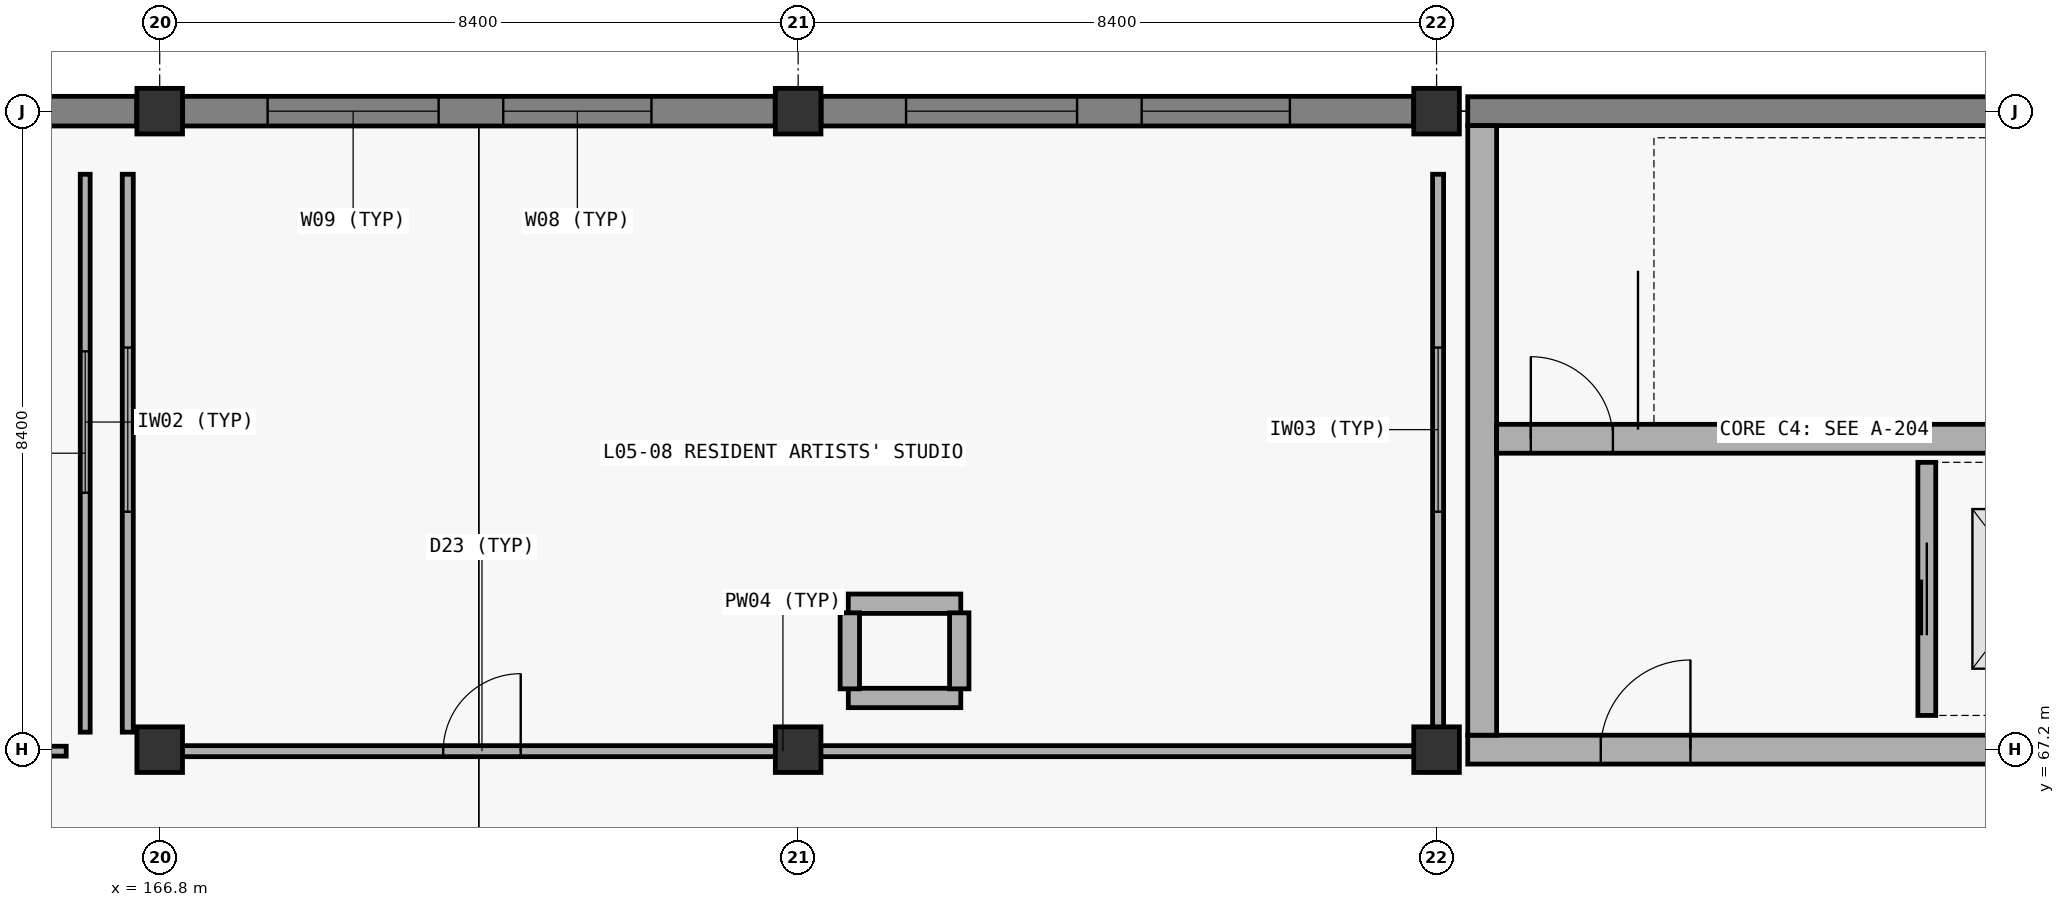
"""IFC4 building model, lengths in metres.
Left out: names, types, materials, properties, quantities, classifications, styles, units other than length and angle.
Written with IfcOpenShell. Run it as: python <this file> out.ifc"""

import sys

from ifc_helpers import new_model, si_unit, direction, frame, frame_2d, origin, origin_2d, place, context, subcontext, project, spatial, rectangle, extrude, element, fill, save


model = new_model("IFC4")
c1 = context("Model", 3, precision=1e-05, world=origin(), true_north=direction((0.0, 1.0)))
c2 = subcontext(c1, "Body", "Model", "MODEL_VIEW")
j1 = project(units=[si_unit("LENGTHUNIT", "METRE"), si_unit("PLANEANGLEUNIT", "RADIAN")], contexts=[c1])
p1 = place(None, origin())
s1 = spatial("IfcSite", under=j1, at=p1, CompositionType="ELEMENT")
p2 = place(p1, origin())
s2 = spatial("IfcBuilding", under=s1, at=p2, CompositionType="ELEMENT")
p3 = place(p2, frame((0.0, 0.0, 26.4)))
s3 = spatial("IfcBuildingStorey", under=s2, at=p3, CompositionType="ELEMENT", Elevation=26.4)
for number, where, z_axis, x_axis in (
    (1, (166.8, 67.2, 0.0), (0.0, 0.0, 1.0), (1.0, 0.0, 0.0)),
    (2, (166.8, 75.6, 0.0), (0.0, 0.0, 1.0), (1.0, 0.0, 0.0)),
    (3, (175.2, 67.2, 0.0), (0.0, 0.0, 1.0), (1.0, 0.0, 0.0)),
    (4, (175.2, 75.6, 0.0), (0.0, 0.0, 1.0), (1.0, 0.0, 0.0)),
    (5, (183.6, 67.2, 0.0), (0.0, 0.0, 1.0), (1.0, 0.0, 0.0)),
    (6, (183.6, 75.6, 0.0), (0.0, 0.0, 1.0), (1.0, 0.0, 0.0)),
):
    element("IfcColumn", number, at=place(p3, frame(where, z_axis=z_axis, x_axis=x_axis)), inside=s3, PredefinedType="COLUMN", context=c2, shape_type="SweptSolid", body=[
        extrude(rectangle(XDim=0.6, YDim=0.6, at=origin_2d()), origin(), (0.0, 0.0, 1.0), 4.5),
    ])
p4 = place(p3, frame((184.01, 67.2, 0.0), z_axis=(0.0, 0.0, 1.0), x_axis=(1.0, 0.0, 0.0)))
e7 = element("IfcWall", 7, at=p4, inside=s3, PredefinedType="SHEAR", context=c2, shape_type="SweptSolid", body=[
    extrude(rectangle(XDim=9.38, YDim=0.38, at=frame_2d((4.69, 0.0))), origin(), (0.0, 0.0, 1.0), 4.5),
])
p5 = place(p4, frame((1.75, 0.0, 0.0)))
e8 = element("IfcOpeningElement", 8, at=p5, cuts=e7, PredefinedType="OPENING", context=c2, shape_type="SweptSolid", body=[
    extrude(rectangle(XDim=1.18, YDim=2.24, at=frame_2d((0.59, 1.12))), frame((0.0, 0.2, 0.0), z_axis=(0.0, -1.0, 0.0), x_axis=(1.0, 0.0, 0.0)), (0.0, 0.0, 1.0), 0.4),
])
p6 = place(p3, frame((184.01, 75.6, 0.0), z_axis=(0.0, 0.0, 1.0), x_axis=(1.0, 0.0, 0.0)))
e9 = element("IfcWall", 9, at=p6, inside=s3, PredefinedType="SHEAR", context=c2, shape_type="SweptSolid", body=[
    extrude(rectangle(XDim=9.38, YDim=0.38, at=frame_2d((4.69, 0.0))), origin(), (0.0, 0.0, 1.0), 4.5),
])
p7 = place(p3, frame((184.2, 67.39, 0.0), z_axis=(0.0, 0.0, 1.0), x_axis=(0.0, 1.0, 0.0)))
e10 = element("IfcWall", 10, at=p7, inside=s3, PredefinedType="SHEAR", context=c2, shape_type="SweptSolid", body=[
    extrude(rectangle(XDim=8.02, YDim=0.38, at=frame_2d((4.01, 0.0))), origin(), (0.0, 0.0, 1.0), 4.5),
])
p8 = place(p3, frame((184.39, 71.29, 0.0), z_axis=(0.0, 0.0, 1.0), x_axis=(1.0, 0.0, 0.0)))
e11 = element("IfcWall", 11, at=p8, inside=s3, PredefinedType="SHEAR", context=c2, shape_type="SweptSolid", body=[
    extrude(rectangle(XDim=8.62, YDim=0.38, at=frame_2d((4.31, 0.0))), origin(), (0.0, 0.0, 1.0), 4.5),
])
p9 = place(p8, frame((0.45, 0.0, 0.0)))
e12 = element("IfcOpeningElement", 12, at=p9, cuts=e11, PredefinedType="OPENING", context=c2, shape_type="SweptSolid", body=[
    extrude(rectangle(XDim=1.08, YDim=2.18, at=frame_2d((0.54, 1.09))), frame((0.0, 0.2, 0.0), z_axis=(0.0, -1.0, 0.0), x_axis=(1.0, 0.0, 0.0)), (0.0, 0.0, 1.0), 0.4),
])
p10 = place(p3, frame((158.702, 75.6, 0.0), z_axis=(0.0, 0.0, 1.0), x_axis=(1.0, 0.0, 0.0)))
e13 = element("IfcWall", 13, at=p10, inside=s3, PredefinedType="SOLIDWALL", context=c2, shape_type="SweptSolid", body=[
    extrude(rectangle(XDim=7.796, YDim=0.39, at=frame_2d((3.898, 0.0))), origin(), (0.0, 0.0, 1.0), 3.83),
])
p11 = place(p10, frame((1.118, 0.0, 0.85)))
e14 = element("IfcOpeningElement", 14, at=p11, cuts=e13, PredefinedType="OPENING", context=c2, shape_type="SweptSolid", body=[
    extrude(rectangle(XDim=2.25, YDim=2.25, at=frame_2d((1.125, 1.125))), frame((0.0, 0.205, 0.0), z_axis=(0.0, -1.0, 0.0), x_axis=(1.0, 0.0, 0.0)), (0.0, 0.0, 1.0), 0.41),
])
p12 = place(p10, frame((4.218, 0.0, 0.85)))
e15 = element("IfcOpeningElement", 15, at=p12, cuts=e13, PredefinedType="OPENING", context=c2, shape_type="SweptSolid", body=[
    extrude(rectangle(XDim=1.95, YDim=2.3, at=frame_2d((0.975, 1.15))), frame((0.0, 0.205, 0.0), z_axis=(0.0, -1.0, 0.0), x_axis=(1.0, 0.0, 0.0)), (0.0, 0.0, 1.0), 0.41),
])
p13 = place(p3, frame((167.102, 75.6, 0.0), z_axis=(0.0, 0.0, 1.0), x_axis=(1.0, 0.0, 0.0)))
e16 = element("IfcWall", 16, at=p13, inside=s3, PredefinedType="SOLIDWALL", context=c2, shape_type="SweptSolid", body=[
    extrude(rectangle(XDim=7.796, YDim=0.39, at=frame_2d((3.898, 0.0))), origin(), (0.0, 0.0, 1.0), 3.58),
])
p14 = place(p13, frame((1.118, 0.0, 0.85)))
e17 = element("IfcOpeningElement", 17, at=p14, cuts=e16, PredefinedType="OPENING", context=c2, shape_type="SweptSolid", body=[
    extrude(rectangle(XDim=2.25, YDim=2.25, at=frame_2d((1.125, 1.125))), frame((0.0, 0.205, 0.0), z_axis=(0.0, -1.0, 0.0), x_axis=(1.0, 0.0, 0.0)), (0.0, 0.0, 1.0), 0.41),
])
p15 = place(p13, frame((4.218, 0.0, 0.85)))
e18 = element("IfcOpeningElement", 18, at=p15, cuts=e16, PredefinedType="OPENING", context=c2, shape_type="SweptSolid", body=[
    extrude(rectangle(XDim=1.95, YDim=2.3, at=frame_2d((0.975, 1.15))), frame((0.0, 0.205, 0.0), z_axis=(0.0, -1.0, 0.0), x_axis=(1.0, 0.0, 0.0)), (0.0, 0.0, 1.0), 0.41),
])
p16 = place(p3, frame((175.502, 75.6, 0.0), z_axis=(0.0, 0.0, 1.0), x_axis=(1.0, 0.0, 0.0)))
e19 = element("IfcWall", 19, at=p16, inside=s3, PredefinedType="SOLIDWALL", context=c2, shape_type="SweptSolid", body=[
    extrude(rectangle(XDim=7.796, YDim=0.39, at=frame_2d((3.898, 0.0))), origin(), (0.0, 0.0, 1.0), 3.83),
])
p17 = place(p16, frame((1.118, 0.0, 0.85)))
e20 = element("IfcOpeningElement", 20, at=p17, cuts=e19, PredefinedType="OPENING", context=c2, shape_type="SweptSolid", body=[
    extrude(rectangle(XDim=2.25, YDim=2.25, at=frame_2d((1.125, 1.125))), frame((0.0, 0.205, 0.0), z_axis=(0.0, -1.0, 0.0), x_axis=(1.0, 0.0, 0.0)), (0.0, 0.0, 1.0), 0.41),
])
p18 = place(p16, frame((4.218, 0.0, 0.85)))
e21 = element("IfcOpeningElement", 21, at=p18, cuts=e19, PredefinedType="OPENING", context=c2, shape_type="SweptSolid", body=[
    extrude(rectangle(XDim=1.95, YDim=2.3, at=frame_2d((0.975, 1.15))), frame((0.0, 0.205, 0.0), z_axis=(0.0, -1.0, 0.0), x_axis=(1.0, 0.0, 0.0)), (0.0, 0.0, 1.0), 0.41),
])
p19 = place(p3, frame((190.05, 67.65, 0.0), z_axis=(0.0, 0.0, 1.0), x_axis=(0.0, 1.0, 0.0)))
e22 = element("IfcWall", 22, at=p19, inside=s3, PredefinedType="PARTITIONING", context=c2, shape_type="SweptSolid", body=[
    extrude(rectangle(XDim=3.33, YDim=0.235, at=frame_2d((1.665, 0.0))), origin(), (0.0, 0.0, 1.0), 4.2),
])
p20 = place(p19, frame((1.055, 0.0, 0.0)))
e23 = element("IfcOpeningElement", 23, at=p20, cuts=e22, PredefinedType="OPENING", context=c2, shape_type="SweptSolid", body=[
    extrude(rectangle(XDim=1.22, YDim=2.24, at=frame_2d((0.61, 1.12))), frame((0.0, 0.127, 0.0), z_axis=(0.0, -1.0, 0.0), x_axis=(1.0, 0.0, 0.0)), (0.0, 0.0, 1.0), 0.255),
])
for number, where, z_axis, x_axis in (
    (24, (175.86, 69.12, 0.0), (0.0, 0.0, 1.0), (1.0, 0.0, 0.0)),
    (25, (175.86, 67.88, 0.0), (0.0, 0.0, 1.0), (1.0, 0.0, 0.0)),
):
    element("IfcWall", number, at=place(p3, frame(where, z_axis=z_axis, x_axis=x_axis)), inside=s3, PredefinedType="PARTITIONING", context=c2, shape_type="SweptSolid", body=[
        extrude(rectangle(XDim=1.48, YDim=0.255, at=frame_2d((0.74, 0.0))), origin(), (0.0, 0.0, 1.0), 4.2),
    ])
for number, where, z_axis, x_axis in (
    (26, (175.88, 68.0, 0.0), (0.0, 0.0, 1.0), (0.0, 1.0, 0.0)),
    (27, (177.32, 68.0, 0.0), (0.0, 0.0, 1.0), (0.0, 1.0, 0.0)),
):
    element("IfcWall", number, at=place(p3, frame(where, z_axis=z_axis, x_axis=x_axis)), inside=s3, PredefinedType="PARTITIONING", context=c2, shape_type="SweptSolid", body=[
        extrude(rectangle(XDim=1.0, YDim=0.255, at=frame_2d((0.5, 0.0))), origin(), (0.0, 0.0, 1.0), 4.2),
    ])
p21 = place(p3, frame((142.43, 67.18, 0.0), z_axis=(0.0, 0.0, 1.0), x_axis=(1.0, 0.0, 0.0)))
e28 = element("IfcWall", 28, at=p21, inside=s3, PredefinedType="PARTITIONING", context=c2, shape_type="SweptSolid", body=[
    extrude(rectangle(XDim=23.14, YDim=0.13, at=frame_2d((11.57, 0.0))), origin(), (0.0, 0.0, 1.0), 3.73),
])
p22 = place(p21, frame((19.4, 0.0, 0.0)))
e29 = element("IfcOpeningElement", 29, at=p22, cuts=e28, PredefinedType="OPENING", context=c2, shape_type="SweptSolid", body=[
    extrude(rectangle(XDim=1.62, YDim=2.38, at=frame_2d((0.81, 1.19))), frame((0.0, 0.075, 0.0), z_axis=(0.0, -1.0, 0.0), x_axis=(1.0, 0.0, 0.0)), (0.0, 0.0, 1.0), 0.15),
])
p23 = place(p3, frame((165.82, 67.43, 0.0), z_axis=(0.0, 0.0, 1.0), x_axis=(0.0, 1.0, 0.0)))
e30 = element("IfcWall", 30, at=p23, inside=s3, PredefinedType="PARTITIONING", context=c2, shape_type="SweptSolid", body=[
    extrude(rectangle(XDim=7.34, YDim=0.13, at=frame_2d((3.67, 0.0))), origin(), (0.0, 0.0, 1.0), 3.78),
])
p24 = place(p23, frame((3.15, 0.0, 0.9)))
e31 = element("IfcOpeningElement", 31, at=p24, cuts=e30, PredefinedType="OPENING", context=c2, shape_type="SweptSolid", body=[
    extrude(rectangle(XDim=1.86, YDim=1.28, at=frame_2d((0.93, 0.64))), frame((0.0, 0.075, 0.0), z_axis=(0.0, -1.0, 0.0), x_axis=(1.0, 0.0, 0.0)), (0.0, 0.0, 1.0), 0.15),
])
p25 = place(p3, frame((166.63, 67.18, 0.0), z_axis=(0.0, 0.0, 1.0), x_axis=(1.0, 0.0, 0.0)))
e32 = element("IfcWall", 32, at=p25, inside=s3, PredefinedType="PARTITIONING", context=c2, shape_type="SweptSolid", body=[
    extrude(rectangle(XDim=16.74, YDim=0.145, at=frame_2d((8.37, 0.0))), origin(), (0.0, 0.0, 1.0), 3.73),
])
p26 = place(p25, frame((3.9, 0.0, 0.0)))
e33 = element("IfcOpeningElement", 33, at=p26, cuts=e32, PredefinedType="OPENING", context=c2, shape_type="SweptSolid", body=[
    extrude(rectangle(XDim=1.02, YDim=2.26, at=frame_2d((0.51, 1.13))), frame((0.0, 0.083, 0.0), z_axis=(0.0, -1.0, 0.0), x_axis=(1.0, 0.0, 0.0)), (0.0, 0.0, 1.0), 0.165),
])
p27 = place(p3, frame((166.38, 67.43, 0.0), z_axis=(0.0, 0.0, 1.0), x_axis=(0.0, 1.0, 0.0)))
e34 = element("IfcWall", 34, at=p27, inside=s3, PredefinedType="PARTITIONING", context=c2, shape_type="SweptSolid", body=[
    extrude(rectangle(XDim=7.34, YDim=0.145, at=frame_2d((3.67, 0.0))), origin(), (0.0, 0.0, 1.0), 3.78),
])
p28 = place(p27, frame((2.9, 0.0, 0.9)))
e35 = element("IfcOpeningElement", 35, at=p28, cuts=e34, PredefinedType="OPENING", context=c2, shape_type="SweptSolid", body=[
    extrude(rectangle(XDim=2.16, YDim=1.42, at=frame_2d((1.08, 0.71))), frame((0.0, 0.083, 0.0), z_axis=(0.0, -1.0, 0.0), x_axis=(1.0, 0.0, 0.0)), (0.0, 0.0, 1.0), 0.165),
])
p29 = place(p3, frame((183.62, 67.43, 0.0), z_axis=(0.0, 0.0, 1.0), x_axis=(0.0, 1.0, 0.0)))
e36 = element("IfcWall", 36, at=p29, inside=s3, PredefinedType="PARTITIONING", context=c2, shape_type="SweptSolid", body=[
    extrude(rectangle(XDim=7.34, YDim=0.145, at=frame_2d((3.67, 0.0))), origin(), (0.0, 0.0, 1.0), 3.73),
])
p30 = place(p29, frame((2.9, 0.0, 0.9)))
e37 = element("IfcOpeningElement", 37, at=p30, cuts=e36, PredefinedType="OPENING", context=c2, shape_type="SweptSolid", body=[
    extrude(rectangle(XDim=2.16, YDim=1.42, at=frame_2d((1.08, 0.71))), frame((0.0, 0.083, 0.0), z_axis=(0.0, -1.0, 0.0), x_axis=(1.0, 0.0, 0.0)), (0.0, 0.0, 1.0), 0.165),
])
p31 = place(p14, origin())
e38 = element("IfcWindow", 38, at=p31, inside=s3, PartitioningType="SINGLE_PANEL", PredefinedType="WINDOW", context=c2, shape_type="SweptSolid", body=[
    extrude(rectangle(XDim=2.25, YDim=2.25, at=frame_2d((1.125, 1.125))), frame((0.0, 0.03, 0.0), z_axis=(0.0, -1.0, 0.0), x_axis=(1.0, 0.0, 0.0)), (0.0, 0.0, 1.0), 0.06),
])
fill(e17, e38)
p32 = place(p15, origin())
e39 = element("IfcWindow", 39, at=p32, inside=s3, PartitioningType="SINGLE_PANEL", PredefinedType="WINDOW", context=c2, shape_type="SweptSolid", body=[
    extrude(rectangle(XDim=1.95, YDim=2.3, at=frame_2d((0.975, 1.15))), frame((0.0, 0.03, 0.0), z_axis=(0.0, -1.0, 0.0), x_axis=(1.0, 0.0, 0.0)), (0.0, 0.0, 1.0), 0.06),
])
fill(e18, e39)
p33 = place(p17, origin())
e40 = element("IfcWindow", 40, at=p33, inside=s3, PartitioningType="SINGLE_PANEL", PredefinedType="WINDOW", context=c2, shape_type="SweptSolid", body=[
    extrude(rectangle(XDim=2.25, YDim=2.25, at=frame_2d((1.125, 1.125))), frame((0.0, 0.03, 0.0), z_axis=(0.0, -1.0, 0.0), x_axis=(1.0, 0.0, 0.0)), (0.0, 0.0, 1.0), 0.06),
])
fill(e20, e40)
p34 = place(p18, origin())
e41 = element("IfcWindow", 41, at=p34, inside=s3, PartitioningType="SINGLE_PANEL", PredefinedType="WINDOW", context=c2, shape_type="SweptSolid", body=[
    extrude(rectangle(XDim=1.95, YDim=2.3, at=frame_2d((0.975, 1.15))), frame((0.0, 0.03, 0.0), z_axis=(0.0, -1.0, 0.0), x_axis=(1.0, 0.0, 0.0)), (0.0, 0.0, 1.0), 0.06),
])
fill(e21, e41)
p35 = place(p9, origin())
e42 = element("IfcDoor", 42, at=p35, inside=s3, OperationType="SINGLE_SWING_LEFT", PredefinedType="DOOR", context=c2, shape_type="SweptSolid", body=[
    extrude(rectangle(XDim=1.08, YDim=2.18, at=frame_2d((0.54, 1.09))), frame((0.0, 0.025, 0.0), z_axis=(0.0, -1.0, 0.0), x_axis=(1.0, 0.0, 0.0)), (0.0, 0.0, 1.0), 0.05),
])
fill(e12, e42)
p36 = place(p5, origin())
e43 = element("IfcDoor", 43, at=p36, inside=s3, OperationType="SINGLE_SWING_RIGHT", PredefinedType="DOOR", context=c2, shape_type="SweptSolid", body=[
    extrude(rectangle(XDim=1.18, YDim=2.24, at=frame_2d((0.59, 1.12))), frame((0.0, 0.025, 0.0), z_axis=(0.0, -1.0, 0.0), x_axis=(1.0, 0.0, 0.0)), (0.0, 0.0, 1.0), 0.05),
])
fill(e8, e43)
p37 = place(p20, origin())
e44 = element("IfcDoor", 44, at=p37, inside=s3, OperationType="SLIDING_TO_RIGHT", PredefinedType="DOOR", context=c2, shape_type="SweptSolid", body=[
    extrude(rectangle(XDim=1.22, YDim=2.24, at=frame_2d((0.61, 1.12))), frame((0.0, 0.025, 0.0), z_axis=(0.0, -1.0, 0.0), x_axis=(1.0, 0.0, 0.0)), (0.0, 0.0, 1.0), 0.05),
])
fill(e23, e44)
p38 = place(p24, origin())
e45 = element("IfcWindow", 45, at=p38, inside=s3, PartitioningType="SINGLE_PANEL", PredefinedType="WINDOW", context=c2, shape_type="SweptSolid", body=[
    extrude(rectangle(XDim=1.86, YDim=1.28, at=frame_2d((0.93, 0.64))), frame((0.0, 0.03, 0.0), z_axis=(0.0, -1.0, 0.0), x_axis=(1.0, 0.0, 0.0)), (0.0, 0.0, 1.0), 0.06),
])
fill(e31, e45)
p39 = place(p26, origin())
e46 = element("IfcDoor", 46, at=p39, inside=s3, OperationType="SINGLE_SWING_RIGHT", PredefinedType="DOOR", context=c2, shape_type="SweptSolid", body=[
    extrude(rectangle(XDim=1.02, YDim=2.26, at=frame_2d((0.51, 1.13))), frame((0.0, 0.025, 0.0), z_axis=(0.0, -1.0, 0.0), x_axis=(1.0, 0.0, 0.0)), (0.0, 0.0, 1.0), 0.05),
])
fill(e33, e46)
p40 = place(p28, origin())
e47 = element("IfcWindow", 47, at=p40, inside=s3, PartitioningType="SINGLE_PANEL", PredefinedType="WINDOW", context=c2, shape_type="SweptSolid", body=[
    extrude(rectangle(XDim=2.16, YDim=1.42, at=frame_2d((1.08, 0.71))), frame((0.0, 0.03, 0.0), z_axis=(0.0, -1.0, 0.0), x_axis=(1.0, 0.0, 0.0)), (0.0, 0.0, 1.0), 0.06),
])
fill(e35, e47)
p41 = place(p30, origin())
e48 = element("IfcWindow", 48, at=p41, inside=s3, PartitioningType="SINGLE_PANEL", PredefinedType="WINDOW", context=c2, shape_type="SweptSolid", body=[
    extrude(rectangle(XDim=2.16, YDim=1.42, at=frame_2d((1.08, 0.71))), frame((0.0, 0.03, 0.0), z_axis=(0.0, -1.0, 0.0), x_axis=(1.0, 0.0, 0.0)), (0.0, 0.0, 1.0), 0.06),
])
fill(e37, e48)
save(model, sys.argv[1])
